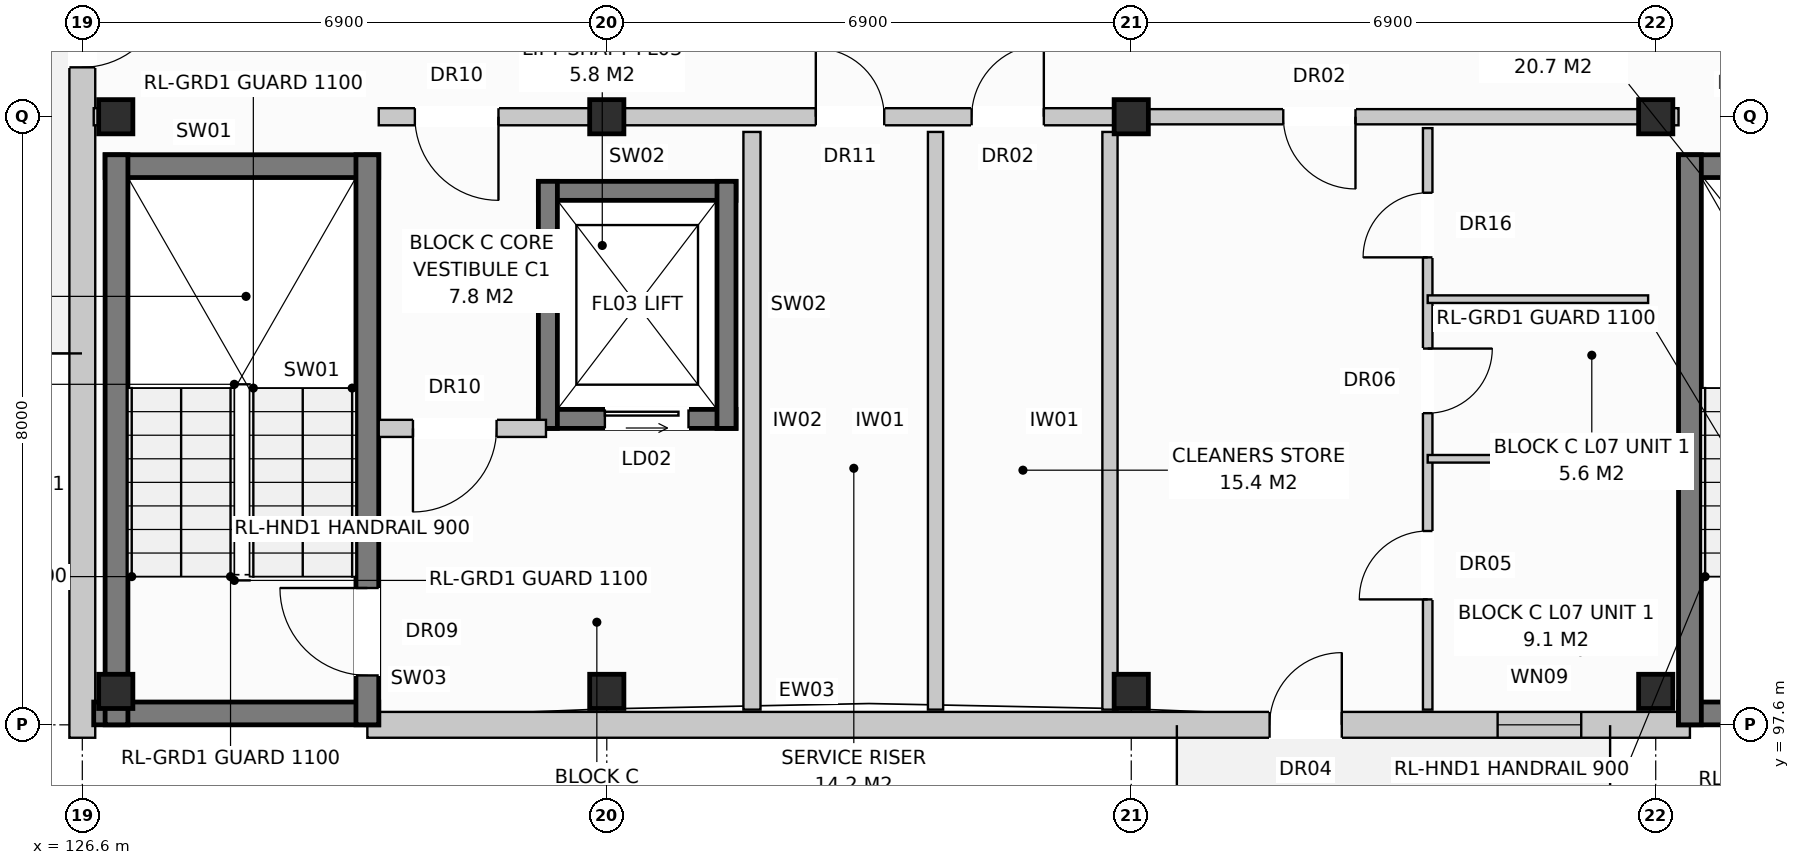
"""IFC4 building model, lengths in metres.
Left out: names, types, materials, properties, quantities, classifications, styles, units other than length and angle.
Written with IfcOpenShell. Run it as: python <this file> out.ifc"""

import sys

from ifc_helpers import new_model, si_unit, direction, frame, frame_2d, origin, origin_with_axes, origin_2d, place, context, subcontext, project, spatial, rectangle, extrude, element, fill, save


model = new_model("IFC4")
c1 = context("Model", 3, precision=1e-05, world=origin(), true_north=direction((0.0, 1.0)))
c2 = subcontext(c1, "Body", "Model", "MODEL_VIEW")
j1 = project(units=[si_unit("LENGTHUNIT", "METRE"), si_unit("PLANEANGLEUNIT", "RADIAN")], contexts=[c1])
p1 = place(None, origin())
s1 = spatial("IfcSite", under=j1, at=p1, CompositionType="ELEMENT")
p2 = place(p1, origin())
s2 = spatial("IfcBuilding", under=s1, at=p2, CompositionType="ELEMENT")
p3 = place(p2, frame((0.0, 0.0, 24.0)))
s3 = spatial("IfcBuildingStorey", under=s2, at=p3, CompositionType="ELEMENT", Elevation=24.0)
for number, where, z_axis, x_axis in (
    (1, (127.04, 98.04, 0.0), (0.0, 0.0, 1.0), (1.0, 0.0, 0.0)),
    (2, (127.04, 105.6, 0.0), (0.0, 0.0, 1.0), (1.0, 0.0, 0.0)),
    (3, (133.5, 98.04, 0.0), (0.0, 0.0, 1.0), (1.0, 0.0, 0.0)),
    (4, (133.5, 105.6, 0.0), (0.0, 0.0, 1.0), (1.0, 0.0, 0.0)),
    (5, (140.4, 98.04, 0.0), (0.0, 0.0, 1.0), (1.0, 0.0, 0.0)),
    (6, (140.4, 105.6, 0.0), (0.0, 0.0, 1.0), (1.0, 0.0, 0.0)),
    (7, (147.3, 98.04, 0.0), (0.0, 0.0, 1.0), (1.0, 0.0, 0.0)),
    (8, (147.3, 105.6, 0.0), (0.0, 0.0, 1.0), (1.0, 0.0, 0.0)),
):
    element("IfcColumn", number, at=place(p3, frame(where, z_axis=z_axis, x_axis=x_axis)), inside=s3, PredefinedType="COLUMN", context=c2, shape_type="SweptSolid", body=[
        extrude(rectangle(XDim=0.45, YDim=0.45, at=origin_2d()), origin(), (0.0, 0.0, 1.0), 3.2),
    ])
p4 = place(p3, frame((130.35, 97.6, 0.0), z_axis=(0.0, 0.0, 1.0), x_axis=(1.0, 0.0, 0.0)))
e9 = element("IfcWall", 9, at=p4, inside=s3, PredefinedType="STANDARD", context=c2, shape_type="SweptSolid", body=[
    extrude(rectangle(XDim=17.4, YDim=0.34, at=frame_2d((8.7, 0.0))), origin(), (0.0, 0.0, 1.0), 2.95),
])
p5 = place(p4, frame((11.87, 0.0, 0.0)))
e10 = element("IfcOpeningElement", 10, at=p5, cuts=e9, PredefinedType="OPENING", context=c2, shape_type="SweptSolid", body=[
    extrude(rectangle(XDim=0.95, YDim=2.1, at=frame_2d((0.475, 1.05))), frame((0.0, 0.182, 0.0), z_axis=(0.0, -1.0, 0.0), x_axis=(1.0, 0.0, 0.0)), (0.0, 0.0, 1.0), 0.364),
])
p6 = place(p4, frame((14.87, 0.0, 0.72)))
e11 = element("IfcOpeningElement", 11, at=p6, cuts=e9, PredefinedType="OPENING", context=c2, shape_type="SweptSolid", body=[
    extrude(rectangle(XDim=1.1, YDim=1.5, at=frame_2d((0.55, 0.75))), frame((0.0, 0.182, 0.0), z_axis=(0.0, -1.0, 0.0), x_axis=(1.0, 0.0, 0.0)), (0.0, 0.0, 1.0), 0.364),
])
p7 = place(p3, frame((126.6, 97.43, 0.0), z_axis=(0.0, 0.0, 1.0), x_axis=(0.0, 1.0, 0.0)))
e12 = element("IfcWall", 12, at=p7, inside=s3, PredefinedType="STANDARD", context=c2, shape_type="SweptSolid", body=[
    extrude(rectangle(XDim=18.74, YDim=0.34, at=frame_2d((9.37, 0.0))), origin(), (0.0, 0.0, 1.0), 2.95),
])
p8 = place(p7, frame((8.82, 0.0, 0.0)))
e13 = element("IfcOpeningElement", 13, at=p8, cuts=e12, PredefinedType="OPENING", context=c2, shape_type="SweptSolid", body=[
    extrude(rectangle(XDim=1.1, YDim=2.1, at=frame_2d((0.55, 1.05))), frame((0.0, 0.182, 0.0), z_axis=(0.0, -1.0, 0.0), x_axis=(1.0, 0.0, 0.0)), (0.0, 0.0, 1.0), 0.364),
])
p9 = place(p7, frame((15.92, 0.0, 0.72)))
e14 = element("IfcOpeningElement", 14, at=p9, cuts=e12, PredefinedType="OPENING", context=c2, shape_type="SweptSolid", body=[
    extrude(rectangle(XDim=1.1, YDim=1.5, at=frame_2d((0.55, 0.75))), frame((0.0, 0.182, 0.0), z_axis=(0.0, -1.0, 0.0), x_axis=(1.0, 0.0, 0.0)), (0.0, 0.0, 1.0), 0.364),
])
p10 = place(p3, frame((126.75, 97.75, 0.0), z_axis=(0.0, 0.0, 1.0), x_axis=(1.0, 0.0, 0.0)))
e15 = element("IfcWall", 15, at=p10, inside=s3, PredefinedType="SHEAR", context=c2, shape_type="SweptSolid", body=[
    extrude(rectangle(XDim=3.75, YDim=0.3, at=frame_2d((1.875, 0.0))), origin(), (0.0, 0.0, 1.0), 2.95),
])
p11 = place(p3, frame((126.9, 104.95, 0.0), z_axis=(0.0, 0.0, 1.0), x_axis=(1.0, 0.0, 0.0)))
e16 = element("IfcWall", 16, at=p11, inside=s3, PredefinedType="SHEAR", context=c2, shape_type="SweptSolid", body=[
    extrude(rectangle(XDim=3.6, YDim=0.3, at=frame_2d((1.8, 0.0))), origin(), (0.0, 0.0, 1.0), 2.95),
])
p12 = place(p3, frame((127.05, 97.6, 0.0), z_axis=(0.0, 0.0, 1.0), x_axis=(0.0, 1.0, 0.0)))
e17 = element("IfcWall", 17, at=p12, inside=s3, PredefinedType="SHEAR", context=c2, shape_type="SweptSolid", body=[
    extrude(rectangle(XDim=7.5, YDim=0.3, at=frame_2d((3.75, 0.0))), origin(), (0.0, 0.0, 1.0), 2.95),
])
p13 = place(p3, frame((130.35, 97.6, 0.0), z_axis=(0.0, 0.0, 1.0), x_axis=(0.0, 1.0, 0.0)))
e18 = element("IfcWall", 18, at=p13, inside=s3, PredefinedType="SHEAR", context=c2, shape_type="SweptSolid", body=[
    extrude(rectangle(XDim=7.5, YDim=0.3, at=frame_2d((3.75, 0.0))), origin(), (0.0, 0.0, 1.0), 2.95),
])
p14 = place(p13, frame((0.65, 0.0, 0.0)))
e19 = element("IfcOpeningElement", 19, at=p14, cuts=e18, PredefinedType="OPENING", context=c2, shape_type="SweptSolid", body=[
    extrude(rectangle(XDim=1.15, YDim=2.15, at=frame_2d((0.575, 1.075))), frame((0.0, 0.162, 0.0), z_axis=(0.0, -1.0, 0.0), x_axis=(1.0, 0.0, 0.0)), (0.0, 0.0, 1.0), 0.324),
])
p15 = place(p3, frame((132.6, 101.625, 0.0), z_axis=(0.0, 0.0, 1.0), x_axis=(1.0, 0.0, 0.0)))
e20 = element("IfcWall", 20, at=p15, inside=s3, PredefinedType="SHEAR", context=c2, shape_type="SweptSolid", body=[
    extrude(rectangle(XDim=2.6, YDim=0.25, at=frame_2d((1.3, 0.0))), origin(), (0.0, 0.0, 1.0), 2.95),
])
p16 = place(p15, frame((0.875, 0.0, 0.0)))
e21 = element("IfcOpeningElement", 21, at=p16, cuts=e20, PredefinedType="OPENING", context=c2, shape_type="SweptSolid", body=[
    extrude(rectangle(XDim=1.1, YDim=2.1, at=frame_2d((0.55, 1.05))), frame((0.0, 0.137, 0.0), z_axis=(0.0, -1.0, 0.0), x_axis=(1.0, 0.0, 0.0)), (0.0, 0.0, 1.0), 0.274),
])
p17 = place(p3, frame((132.6, 104.625, 0.0), z_axis=(0.0, 0.0, 1.0), x_axis=(1.0, 0.0, 0.0)))
e22 = element("IfcWall", 22, at=p17, inside=s3, PredefinedType="SHEAR", context=c2, shape_type="SweptSolid", body=[
    extrude(rectangle(XDim=2.6, YDim=0.25, at=frame_2d((1.3, 0.0))), origin(), (0.0, 0.0, 1.0), 2.95),
])
for number, where, z_axis, x_axis in (
    (23, (132.725, 101.5, 0.0), (0.0, 0.0, 1.0), (0.0, 1.0, 0.0)),
    (24, (135.075, 101.5, 0.0), (0.0, 0.0, 1.0), (0.0, 1.0, 0.0)),
):
    element("IfcWall", number, at=place(p3, frame(where, z_axis=z_axis, x_axis=x_axis)), inside=s3, PredefinedType="SHEAR", context=c2, shape_type="SweptSolid", body=[
        extrude(rectangle(XDim=3.25, YDim=0.25, at=frame_2d((1.625, 0.0))), origin(), (0.0, 0.0, 1.0), 2.95),
    ])
p18 = place(p3, frame((135.41, 97.8, 0.0), z_axis=(0.0, 0.0, 1.0), x_axis=(0.0, 1.0, 0.0)))
e25 = element("IfcWall", 25, at=p18, inside=s3, PredefinedType="PARTITIONING", context=c2, shape_type="SweptSolid", body=[
    extrude(rectangle(XDim=7.6, YDim=0.225, at=frame_2d((3.8, 0.0))), origin(), (0.0, 0.0, 1.0), 2.59),
])
p19 = place(p3, frame((130.5, 101.5, 0.0), z_axis=(0.0, 0.0, 1.0), x_axis=(1.0, 0.0, 0.0)))
e26 = element("IfcWall", 26, at=p19, inside=s3, PredefinedType="PARTITIONING", context=c2, shape_type="SweptSolid", body=[
    extrude(rectangle(XDim=2.2, YDim=0.225, at=frame_2d((1.1, 0.0))), origin(), (0.0, 0.0, 1.0), 2.95),
])
p20 = place(p19, frame((0.45, 0.0, 0.0)))
e27 = element("IfcOpeningElement", 27, at=p20, cuts=e26, PredefinedType="OPENING", context=c2, shape_type="SweptSolid", body=[
    extrude(rectangle(XDim=1.1, YDim=2.15, at=frame_2d((0.55, 1.075))), frame((0.0, 0.125, 0.0), z_axis=(0.0, -1.0, 0.0), x_axis=(1.0, 0.0, 0.0)), (0.0, 0.0, 1.0), 0.249),
])
p21 = place(p3, frame((126.75, 105.6, 0.0), z_axis=(0.0, 0.0, 1.0), x_axis=(1.0, 0.0, 0.0)))
e28 = element("IfcWall", 28, at=p21, inside=s3, PredefinedType="PARTITIONING", context=c2, shape_type="SweptSolid", body=[
    extrude(rectangle(XDim=0.15, YDim=0.225, at=frame_2d((0.075, 0.0))), origin(), (0.0, 0.0, 1.0), 2.95),
])
p22 = place(p3, frame((137.825, 97.8, 0.0), z_axis=(0.0, 0.0, 1.0), x_axis=(0.0, 1.0, 0.0)))
e29 = element("IfcWall", 29, at=p22, inside=s3, PredefinedType="PARTITIONING", context=c2, shape_type="SweptSolid", body=[
    extrude(rectangle(XDim=7.6, YDim=0.2, at=frame_2d((3.8, 0.0))), origin(), (0.0, 0.0, 1.0), 2.59),
])
p23 = place(p3, frame((140.12, 97.8, 0.0), z_axis=(0.0, 0.0, 1.0), x_axis=(0.0, 1.0, 0.0)))
e30 = element("IfcWall", 30, at=p23, inside=s3, PredefinedType="PARTITIONING", context=c2, shape_type="SweptSolid", body=[
    extrude(rectangle(XDim=7.6, YDim=0.2, at=frame_2d((3.8, 0.0))), origin(), (0.0, 0.0, 1.0), 2.95),
])
p24 = place(p3, frame((130.5, 105.6, 0.0), z_axis=(0.0, 0.0, 1.0), x_axis=(1.0, 0.0, 0.0)))
e31 = element("IfcWall", 31, at=p24, inside=s3, PredefinedType="PARTITIONING", context=c2, shape_type="SweptSolid", body=[
    extrude(rectangle(XDim=9.9, YDim=0.225, at=frame_2d((4.95, 0.0))), origin(), (0.0, 0.0, 1.0), 2.39),
])
p25 = place(p24, frame((0.475, 0.0, 0.0)))
e32 = element("IfcOpeningElement", 32, at=p25, cuts=e31, PredefinedType="OPENING", context=c2, shape_type="SweptSolid", body=[
    extrude(rectangle(XDim=1.1, YDim=2.15, at=frame_2d((0.55, 1.075))), frame((0.0, 0.125, 0.0), z_axis=(0.0, -1.0, 0.0), x_axis=(1.0, 0.0, 0.0)), (0.0, 0.0, 1.0), 0.249),
])
p26 = place(p24, frame((5.75, 0.0, 0.0)))
e33 = element("IfcOpeningElement", 33, at=p26, cuts=e31, PredefinedType="OPENING", context=c2, shape_type="SweptSolid", body=[
    extrude(rectangle(XDim=0.9, YDim=2.1, at=frame_2d((0.45, 1.05))), frame((0.0, 0.125, 0.0), z_axis=(0.0, -1.0, 0.0), x_axis=(1.0, 0.0, 0.0)), (0.0, 0.0, 1.0), 0.249),
])
p27 = place(p24, frame((7.8, 0.0, 0.0)))
e34 = element("IfcOpeningElement", 34, at=p27, cuts=e31, PredefinedType="OPENING", context=c2, shape_type="SweptSolid", body=[
    extrude(rectangle(XDim=0.95, YDim=2.15, at=frame_2d((0.475, 1.075))), frame((0.0, 0.125, 0.0), z_axis=(0.0, -1.0, 0.0), x_axis=(1.0, 0.0, 0.0)), (0.0, 0.0, 1.0), 0.249),
])
for number, where, z_axis, x_axis in (
    (35, (147.6, 97.75, 0.0), (0.0, 0.0, 1.0), (1.0, 0.0, 0.0)),
    (36, (147.6, 104.95, 0.0), (0.0, 0.0, 1.0), (1.0, 0.0, 0.0)),
):
    element("IfcWall", number, at=place(p3, frame(where, z_axis=z_axis, x_axis=x_axis)), inside=s3, PredefinedType="SHEAR", context=c2, shape_type="SweptSolid", body=[
        extrude(rectangle(XDim=3.6, YDim=0.3, at=frame_2d((1.8, 0.0))), origin(), (0.0, 0.0, 1.0), 2.95),
    ])
p28 = place(p3, frame((147.75, 97.6, 0.0), z_axis=(0.0, 0.0, 1.0), x_axis=(0.0, 1.0, 0.0)))
e37 = element("IfcWall", 37, at=p28, inside=s3, PredefinedType="SHEAR", context=c2, shape_type="SweptSolid", body=[
    extrude(rectangle(XDim=7.5, YDim=0.3, at=frame_2d((3.75, 0.0))), origin(), (0.0, 0.0, 1.0), 2.95),
])
p29 = place(p3, frame((147.3, 105.6, 0.0), z_axis=(0.0, 0.0, 1.0), x_axis=(1.0, 0.0, 0.0)))
e38 = element("IfcWall", 38, at=p29, inside=s3, PredefinedType="PARTITIONING", context=c2, shape_type="SweptSolid", body=[
    extrude(rectangle(XDim=0.3, YDim=0.225, at=frame_2d((0.15, 0.0))), origin(), (0.0, 0.0, 1.0), 2.95),
])
p30 = place(p3, frame((140.4, 105.6, 0.0), z_axis=(0.0, 0.0, 1.0), x_axis=(1.0, 0.0, 0.0)))
e39 = element("IfcWall", 39, at=p30, inside=s3, PredefinedType="PARTITIONING", context=c2, shape_type="SweptSolid", body=[
    extrude(rectangle(XDim=6.9, YDim=0.2, at=frame_2d((3.45, 0.0))), origin(), (0.0, 0.0, 1.0), 2.39),
])
p31 = place(p30, frame((2.0, 0.0, 0.0)))
e40 = element("IfcOpeningElement", 40, at=p31, cuts=e39, PredefinedType="OPENING", context=c2, shape_type="SweptSolid", body=[
    extrude(rectangle(XDim=0.95, YDim=2.15, at=frame_2d((0.475, 1.075))), frame((0.0, 0.112, 0.0), z_axis=(0.0, -1.0, 0.0), x_axis=(1.0, 0.0, 0.0)), (0.0, 0.0, 1.0), 0.224),
])
p32 = place(p3, frame((144.3, 105.45, 0.0), z_axis=(0.0, 0.0, 1.0), x_axis=(0.0, -1.0, 0.0)))
e41 = element("IfcWall", 41, at=p32, inside=s3, PredefinedType="PARTITIONING", context=c2, shape_type="SweptSolid", body=[
    extrude(rectangle(XDim=7.65, YDim=0.125, at=frame_2d((3.825, 0.0))), origin(), (0.0, 0.0, 1.0), 2.95),
])
p33 = place(p32, frame((0.85, 0.0, 0.0)))
e42 = element("IfcOpeningElement", 42, at=p33, cuts=e41, PredefinedType="OPENING", context=c2, shape_type="SweptSolid", body=[
    extrude(rectangle(XDim=0.85, YDim=2.1, at=frame_2d((0.425, 1.05))), frame((0.0, 0.074, 0.0), z_axis=(0.0, -1.0, 0.0), x_axis=(1.0, 0.0, 0.0)), (0.0, 0.0, 1.0), 0.149),
])
p34 = place(p32, frame((2.9, 0.0, 0.0)))
e43 = element("IfcOpeningElement", 43, at=p34, cuts=e41, PredefinedType="OPENING", context=c2, shape_type="SweptSolid", body=[
    extrude(rectangle(XDim=0.85, YDim=2.05, at=frame_2d((0.425, 1.025))), frame((0.0, 0.074, 0.0), z_axis=(0.0, -1.0, 0.0), x_axis=(1.0, 0.0, 0.0)), (0.0, 0.0, 1.0), 0.149),
])
p35 = place(p32, frame((5.3, 0.0, 0.0)))
e44 = element("IfcOpeningElement", 44, at=p35, cuts=e41, PredefinedType="OPENING", context=c2, shape_type="SweptSolid", body=[
    extrude(rectangle(XDim=0.9, YDim=2.1, at=frame_2d((0.45, 1.05))), frame((0.0, 0.074, 0.0), z_axis=(0.0, -1.0, 0.0), x_axis=(1.0, 0.0, 0.0)), (0.0, 0.0, 1.0), 0.149),
])
for number, where, z_axis, x_axis in (
    (45, (144.3, 103.2, 0.0), (0.0, 0.0, 1.0), (1.0, 0.0, 0.0)),
    (46, (144.3, 101.1, 0.0), (0.0, 0.0, 1.0), (1.0, 0.0, 0.0)),
):
    element("IfcWall", number, at=place(p3, frame(where, z_axis=z_axis, x_axis=x_axis)), inside=s3, PredefinedType="PARTITIONING", context=c2, shape_type="SweptSolid", body=[
        extrude(rectangle(XDim=2.9, YDim=0.1, at=frame_2d((1.45, 0.0))), origin(), (0.0, 0.0, 1.0), 2.95),
    ])
p36 = place(p5, origin_with_axes())
e47 = element("IfcDoor", 47, at=p36, inside=s3, OperationType="SINGLE_SWING_RIGHT", PredefinedType="DOOR", context=c2, shape_type="SweptSolid", body=[
    extrude(rectangle(XDim=0.95, YDim=2.1, at=frame_2d((0.475, 1.05))), frame((0.0, 0.025, 0.0), z_axis=(0.0, -1.0, 0.0), x_axis=(1.0, 0.0, 0.0)), (0.0, 0.0, 1.0), 0.05),
])
fill(e10, e47)
p37 = place(p6, origin_with_axes())
e48 = element("IfcWindow", 48, at=p37, inside=s3, PartitioningType="SINGLE_PANEL", PredefinedType="WINDOW", context=c2, shape_type="SweptSolid", body=[
    extrude(rectangle(XDim=1.1, YDim=1.5, at=frame_2d((0.55, 0.75))), frame((0.0, 0.03, 0.0), z_axis=(0.0, -1.0, 0.0), x_axis=(1.0, 0.0, 0.0)), (0.0, 0.0, 1.0), 0.06),
])
fill(e11, e48)
p38 = place(p8, frame((1.1, 0.0, 0.0), z_axis=(0.0, 0.0, 1.0), x_axis=(-1.0, 0.0, 0.0)))
e49 = element("IfcDoor", 49, at=p38, inside=s3, OperationType="SINGLE_SWING_RIGHT", PredefinedType="DOOR", context=c2, shape_type="SweptSolid", body=[
    extrude(rectangle(XDim=1.1, YDim=2.1, at=frame_2d((0.55, 1.05))), frame((0.0, 0.025, 0.0), z_axis=(0.0, -1.0, 0.0), x_axis=(1.0, 0.0, 0.0)), (0.0, 0.0, 1.0), 0.05),
])
fill(e13, e49)
p39 = place(p14, origin_with_axes())
e50 = element("IfcDoor", 50, at=p39, inside=s3, OperationType="SINGLE_SWING_RIGHT", PredefinedType="DOOR", context=c2, shape_type="SweptSolid", body=[
    extrude(rectangle(XDim=1.15, YDim=2.15, at=frame_2d((0.575, 1.075))), frame((0.0, 0.025, 0.0), z_axis=(0.0, -1.0, 0.0), x_axis=(1.0, 0.0, 0.0)), (0.0, 0.0, 1.0), 0.05),
])
fill(e19, e50)
p40 = place(p16, origin_with_axes())
e51 = element("IfcDoor", 51, at=p40, inside=s3, OperationType="SLIDING_TO_LEFT", PredefinedType="DOOR", context=c2, shape_type="SweptSolid", body=[
    extrude(rectangle(XDim=1.1, YDim=2.1, at=frame_2d((0.55, 1.05))), frame((0.0, 0.025, 0.0), z_axis=(0.0, -1.0, 0.0), x_axis=(1.0, 0.0, 0.0)), (0.0, 0.0, 1.0), 0.05),
])
fill(e21, e51)
p41 = place(p20, frame((1.1, 0.0, 0.0), z_axis=(0.0, 0.0, 1.0), x_axis=(-1.0, 0.0, 0.0)))
e52 = element("IfcDoor", 52, at=p41, inside=s3, OperationType="SINGLE_SWING_LEFT", PredefinedType="DOOR", context=c2, shape_type="SweptSolid", body=[
    extrude(rectangle(XDim=1.1, YDim=2.15, at=frame_2d((0.55, 1.075))), frame((0.0, 0.025, 0.0), z_axis=(0.0, -1.0, 0.0), x_axis=(1.0, 0.0, 0.0)), (0.0, 0.0, 1.0), 0.05),
])
fill(e27, e52)
p42 = place(p25, frame((1.1, 0.0, 0.0), z_axis=(0.0, 0.0, 1.0), x_axis=(-1.0, 0.0, 0.0)))
e53 = element("IfcDoor", 53, at=p42, inside=s3, OperationType="SINGLE_SWING_RIGHT", PredefinedType="DOOR", context=c2, shape_type="SweptSolid", body=[
    extrude(rectangle(XDim=1.1, YDim=2.15, at=frame_2d((0.55, 1.075))), frame((0.0, 0.025, 0.0), z_axis=(0.0, -1.0, 0.0), x_axis=(1.0, 0.0, 0.0)), (0.0, 0.0, 1.0), 0.05),
])
fill(e32, e53)
p43 = place(p26, origin_with_axes())
e54 = element("IfcDoor", 54, at=p43, inside=s3, OperationType="SINGLE_SWING_LEFT", PredefinedType="DOOR", context=c2, shape_type="SweptSolid", body=[
    extrude(rectangle(XDim=0.9, YDim=2.1, at=frame_2d((0.45, 1.05))), frame((0.0, 0.025, 0.0), z_axis=(0.0, -1.0, 0.0), x_axis=(1.0, 0.0, 0.0)), (0.0, 0.0, 1.0), 0.05),
])
fill(e33, e54)
p44 = place(p27, origin_with_axes())
e55 = element("IfcDoor", 55, at=p44, inside=s3, OperationType="SINGLE_SWING_RIGHT", PredefinedType="DOOR", context=c2, shape_type="SweptSolid", body=[
    extrude(rectangle(XDim=0.95, YDim=2.15, at=frame_2d((0.475, 1.075))), frame((0.0, 0.025, 0.0), z_axis=(0.0, -1.0, 0.0), x_axis=(1.0, 0.0, 0.0)), (0.0, 0.0, 1.0), 0.05),
])
fill(e34, e55)
p45 = place(p31, frame((0.95, 0.0, 0.0), z_axis=(0.0, 0.0, 1.0), x_axis=(-1.0, 0.0, 0.0)))
e56 = element("IfcDoor", 56, at=p45, inside=s3, OperationType="SINGLE_SWING_RIGHT", PredefinedType="DOOR", context=c2, shape_type="SweptSolid", body=[
    extrude(rectangle(XDim=0.95, YDim=2.15, at=frame_2d((0.475, 1.075))), frame((0.0, 0.025, 0.0), z_axis=(0.0, -1.0, 0.0), x_axis=(1.0, 0.0, 0.0)), (0.0, 0.0, 1.0), 0.05),
])
fill(e40, e56)
p46 = place(p33, frame((0.85, 0.0, 0.0), z_axis=(0.0, 0.0, 1.0), x_axis=(-1.0, 0.0, 0.0)))
e57 = element("IfcDoor", 57, at=p46, inside=s3, OperationType="SINGLE_SWING_RIGHT", PredefinedType="DOOR", context=c2, shape_type="SweptSolid", body=[
    extrude(rectangle(XDim=0.85, YDim=2.1, at=frame_2d((0.425, 1.05))), frame((0.0, 0.025, 0.0), z_axis=(0.0, -1.0, 0.0), x_axis=(1.0, 0.0, 0.0)), (0.0, 0.0, 1.0), 0.05),
])
fill(e42, e57)
p47 = place(p34, origin_with_axes())
e58 = element("IfcDoor", 58, at=p47, inside=s3, OperationType="SINGLE_SWING_LEFT", PredefinedType="DOOR", context=c2, shape_type="SweptSolid", body=[
    extrude(rectangle(XDim=0.85, YDim=2.05, at=frame_2d((0.425, 1.025))), frame((0.0, 0.025, 0.0), z_axis=(0.0, -1.0, 0.0), x_axis=(1.0, 0.0, 0.0)), (0.0, 0.0, 1.0), 0.05),
])
fill(e43, e58)
p48 = place(p35, frame((0.9, 0.0, 0.0), z_axis=(0.0, 0.0, 1.0), x_axis=(-1.0, 0.0, 0.0)))
e59 = element("IfcDoor", 59, at=p48, inside=s3, OperationType="SINGLE_SWING_RIGHT", PredefinedType="DOOR", context=c2, shape_type="SweptSolid", body=[
    extrude(rectangle(XDim=0.9, YDim=2.1, at=frame_2d((0.45, 1.05))), frame((0.0, 0.025, 0.0), z_axis=(0.0, -1.0, 0.0), x_axis=(1.0, 0.0, 0.0)), (0.0, 0.0, 1.0), 0.05),
])
fill(e44, e59)
save(model, sys.argv[1])
